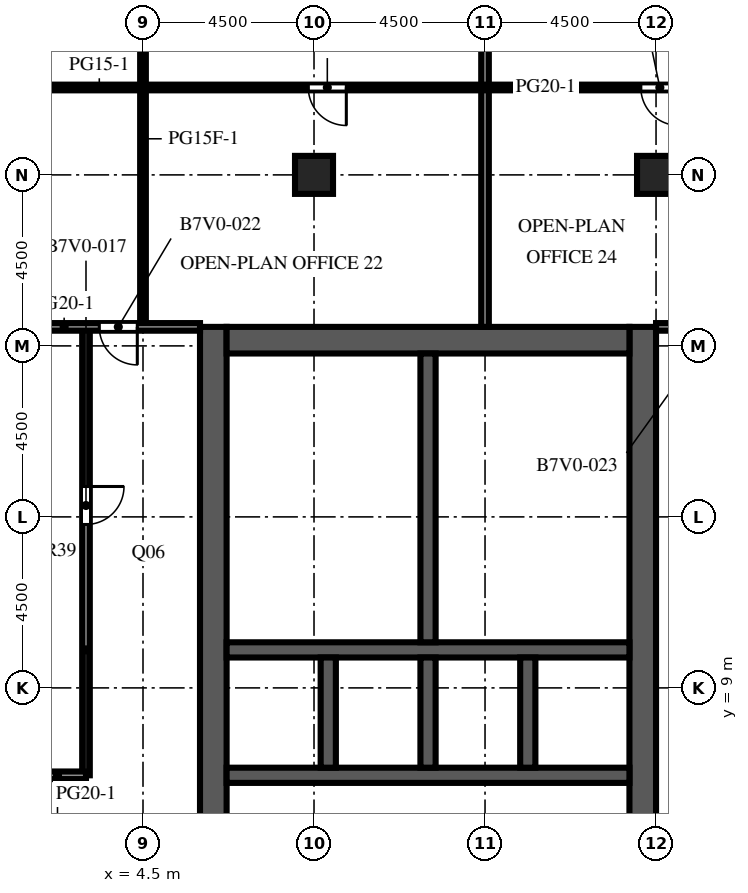
"""IFC4 building model, lengths in metres.
Left out: names, types, materials, properties, quantities, classifications, styles, units other than length and angle.
Written with IfcOpenShell. Run it as: python <this file> out.ifc"""

import sys

from ifc_helpers import new_model, si_unit, direction, frame, frame_2d, origin, origin_2d, place, context, subcontext, project, spatial, rectangle, extrude, element, fill, save


model = new_model("IFC4")
c1 = context("Model", 3, precision=1e-05, world=origin(), true_north=direction((0.0, 1.0)))
c2 = subcontext(c1, "Body", "Model", "MODEL_VIEW")
j1 = project(units=[si_unit("LENGTHUNIT", "METRE"), si_unit("PLANEANGLEUNIT", "RADIAN")], contexts=[c1])
p1 = place(None, origin())
s1 = spatial("IfcSite", under=j1, at=p1, CompositionType="ELEMENT")
p2 = place(p1, origin())
s2 = spatial("IfcBuilding", under=s1, at=p2, CompositionType="ELEMENT")
p3 = place(p2, frame((0.0, 0.0, 235.7)))
s3 = spatial("IfcBuildingStorey", under=s2, at=p3, CompositionType="ELEMENT", Elevation=235.7)
for number, where, z_axis, x_axis in (
    (1, (9.0, 22.5, 0.0), (0.0, 0.0, 1.0), (1.0, 0.0, 0.0)),
    (2, (18.0, 22.5, 0.0), (0.0, 0.0, 1.0), (1.0, 0.0, 0.0)),
):
    element("IfcColumn", number, at=place(p3, frame(where, z_axis=z_axis, x_axis=x_axis)), inside=s3, PredefinedType="COLUMN", context=c2, shape_type="SweptSolid", body=[
        extrude(rectangle(XDim=1.0, YDim=1.0, at=origin_2d()), origin(), (0.0, 0.0, 1.0), 4.1),
    ])
p4 = place(p3, frame((6.35, -9.0, 0.0), z_axis=(0.0, 0.0, 1.0), x_axis=(0.0, 1.0, 0.0)))
e3 = element("IfcWall", 3, at=p4, inside=s3, PredefinedType="SHEAR", context=c2, shape_type="SweptSolid", body=[
    extrude(rectangle(XDim=27.5, YDim=0.7, at=frame_2d((13.75, 0.0))), origin(), (0.0, 0.0, 1.0), 4.1),
])
p5 = place(p4, frame((12.55, 0.0, 0.0)))
e4 = element("IfcOpeningElement", 4, at=p5, cuts=e3, PredefinedType="OPENING", context=c2, shape_type="SweptSolid", body=[
    extrude(rectangle(XDim=2.4, YDim=2.4, at=frame_2d((1.2, 1.2))), frame((0.0, 0.36, 0.0), z_axis=(0.0, -1.0, 0.0), x_axis=(1.0, 0.0, 0.0)), (0.0, 0.0, 1.0), 0.72),
])
p6 = place(p4, frame((5.42, 0.0, 0.0)))
e5 = element("IfcOpeningElement", 5, at=p6, cuts=e3, PredefinedType="OPENING", context=c2, shape_type="SweptSolid", body=[
    extrude(rectangle(XDim=1.2, YDim=2.1, at=frame_2d((0.6, 1.05))), frame((0.0, 0.36, 0.0), z_axis=(0.0, -1.0, 0.0), x_axis=(1.0, 0.0, 0.0)), (0.0, 0.0, 1.0), 0.72),
])
p7 = place(p4, frame((19.46, 0.0, 0.0)))
e6 = element("IfcOpeningElement", 6, at=p7, cuts=e3, PredefinedType="OPENING", context=c2, shape_type="SweptSolid", body=[
    extrude(rectangle(XDim=1.0, YDim=2.1, at=frame_2d((0.5, 1.05))), frame((0.0, 0.36, 0.0), z_axis=(0.0, -1.0, 0.0), x_axis=(1.0, 0.0, 0.0)), (0.0, 0.0, 1.0), 0.72),
])
p8 = place(p4, frame((21.17, 0.0, 0.0)))
e7 = element("IfcOpeningElement", 7, at=p8, cuts=e3, PredefinedType="OPENING", context=c2, shape_type="SweptSolid", body=[
    extrude(rectangle(XDim=1.0, YDim=2.1, at=frame_2d((0.5, 1.05))), frame((0.0, 0.36, 0.0), z_axis=(0.0, -1.0, 0.0), x_axis=(1.0, 0.0, 0.0)), (0.0, 0.0, 1.0), 0.72),
])
p9 = place(p4, frame((23.26, 0.0, 0.0)))
e8 = element("IfcOpeningElement", 8, at=p9, cuts=e3, PredefinedType="OPENING", context=c2, shape_type="SweptSolid", body=[
    extrude(rectangle(XDim=1.0, YDim=2.1, at=frame_2d((0.5, 1.05))), frame((0.0, 0.36, 0.0), z_axis=(0.0, -1.0, 0.0), x_axis=(1.0, 0.0, 0.0)), (0.0, 0.0, 1.0), 0.72),
])
p10 = place(p4, frame((25.35, 0.0, 0.0)))
e9 = element("IfcOpeningElement", 9, at=p10, cuts=e3, PredefinedType="OPENING", context=c2, shape_type="SweptSolid", body=[
    extrude(rectangle(XDim=1.0, YDim=2.1, at=frame_2d((0.5, 1.05))), frame((0.0, 0.36, 0.0), z_axis=(0.0, -1.0, 0.0), x_axis=(1.0, 0.0, 0.0)), (0.0, 0.0, 1.0), 0.72),
])
p11 = place(p3, frame((17.65, -9.0, 0.0), z_axis=(0.0, 0.0, 1.0), x_axis=(0.0, 1.0, 0.0)))
e10 = element("IfcWall", 10, at=p11, inside=s3, PredefinedType="SHEAR", context=c2, shape_type="SweptSolid", body=[
    extrude(rectangle(XDim=27.5, YDim=0.7, at=frame_2d((13.75, 0.0))), origin(), (0.0, 0.0, 1.0), 4.1),
])
p12 = place(p11, frame((12.55, 0.0, 0.0)))
e11 = element("IfcOpeningElement", 11, at=p12, cuts=e10, PredefinedType="OPENING", context=c2, shape_type="SweptSolid", body=[
    extrude(rectangle(XDim=2.4, YDim=2.4, at=frame_2d((1.2, 1.2))), frame((0.0, 0.36, 0.0), z_axis=(0.0, -1.0, 0.0), x_axis=(1.0, 0.0, 0.0)), (0.0, 0.0, 1.0), 0.72),
])
p13 = place(p11, frame((6.825, 0.0, 0.0)))
e12 = element("IfcOpeningElement", 12, at=p13, cuts=e10, PredefinedType="OPENING", context=c2, shape_type="SweptSolid", body=[
    extrude(rectangle(XDim=1.2, YDim=2.1, at=frame_2d((0.6, 1.05))), frame((0.0, 0.36, 0.0), z_axis=(0.0, -1.0, 0.0), x_axis=(1.0, 0.0, 0.0)), (0.0, 0.0, 1.0), 0.72),
])
p14 = place(p11, frame((19.475, 0.0, 0.0)))
e13 = element("IfcOpeningElement", 13, at=p14, cuts=e10, PredefinedType="OPENING", context=c2, shape_type="SweptSolid", body=[
    extrude(rectangle(XDim=1.2, YDim=2.1, at=frame_2d((0.6, 1.05))), frame((0.0, 0.36, 0.0), z_axis=(0.0, -1.0, 0.0), x_axis=(1.0, 0.0, 0.0)), (0.0, 0.0, 1.0), 0.72),
])
p15 = place(p3, frame((6.7, 18.15, 0.0), z_axis=(0.0, 0.0, 1.0), x_axis=(1.0, 0.0, 0.0)))
e14 = element("IfcWall", 14, at=p15, inside=s3, PredefinedType="SHEAR", context=c2, shape_type="SweptSolid", body=[
    extrude(rectangle(XDim=10.6, YDim=0.7, at=frame_2d((5.3, 0.0))), origin(), (0.0, 0.0, 1.0), 4.1),
])
p16 = place(p3, frame((6.7, 6.7, 0.0), z_axis=(0.0, 0.0, 1.0), x_axis=(1.0, 0.0, 0.0)))
e15 = element("IfcWall", 15, at=p16, inside=s3, PredefinedType="SHEAR", context=c2, shape_type="SweptSolid", body=[
    extrude(rectangle(XDim=10.6, YDim=0.4, at=frame_2d((5.3, 0.0))), origin(), (0.0, 0.0, 1.0), 4.1),
])
p17 = place(p16, frame((3.438, 0.0, 0.0)))
e16 = element("IfcOpeningElement", 16, at=p17, cuts=e15, PredefinedType="OPENING", context=c2, shape_type="SweptSolid", body=[
    extrude(rectangle(XDim=1.1, YDim=2.1, at=frame_2d((0.55, 1.05))), frame((0.0, 0.21, 0.0), z_axis=(0.0, -1.0, 0.0), x_axis=(1.0, 0.0, 0.0)), (0.0, 0.0, 1.0), 0.42),
])
p18 = place(p16, frame((6.062, 0.0, 0.0)))
e17 = element("IfcOpeningElement", 17, at=p18, cuts=e15, PredefinedType="OPENING", context=c2, shape_type="SweptSolid", body=[
    extrude(rectangle(XDim=1.1, YDim=2.1, at=frame_2d((0.55, 1.05))), frame((0.0, 0.21, 0.0), z_axis=(0.0, -1.0, 0.0), x_axis=(1.0, 0.0, 0.0)), (0.0, 0.0, 1.0), 0.42),
])
p19 = place(p16, frame((8.812, 0.0, 0.0)))
e18 = element("IfcOpeningElement", 18, at=p19, cuts=e15, PredefinedType="OPENING", context=c2, shape_type="SweptSolid", body=[
    extrude(rectangle(XDim=1.1, YDim=2.1, at=frame_2d((0.55, 1.05))), frame((0.0, 0.21, 0.0), z_axis=(0.0, -1.0, 0.0), x_axis=(1.0, 0.0, 0.0)), (0.0, 0.0, 1.0), 0.42),
])
p20 = place(p16, frame((0.738, 0.0, 0.0)))
e19 = element("IfcOpeningElement", 19, at=p20, cuts=e15, PredefinedType="OPENING", context=c2, shape_type="SweptSolid", body=[
    extrude(rectangle(XDim=1.0, YDim=2.1, at=frame_2d((0.5, 1.05))), frame((0.0, 0.21, 0.0), z_axis=(0.0, -1.0, 0.0), x_axis=(1.0, 0.0, 0.0)), (0.0, 0.0, 1.0), 0.42),
])
p21 = place(p3, frame((6.7, 10.0, 0.0), z_axis=(0.0, 0.0, 1.0), x_axis=(1.0, 0.0, 0.0)))
e20 = element("IfcWall", 20, at=p21, inside=s3, PredefinedType="SHEAR", context=c2, shape_type="SweptSolid", body=[
    extrude(rectangle(XDim=10.6, YDim=0.4, at=frame_2d((5.3, 0.0))), origin(), (0.0, 0.0, 1.0), 4.1),
])
for number, where, z_axis, x_axis in (
    (21, (9.375, 6.9, 0.0), (0.0, 0.0, 1.0), (0.0, 1.0, 0.0)),
    (22, (12.0, 6.9, 0.0), (0.0, 0.0, 1.0), (0.0, 1.0, 0.0)),
    (23, (14.625, 6.9, 0.0), (0.0, 0.0, 1.0), (0.0, 1.0, 0.0)),
):
    element("IfcWall", number, at=place(p3, frame(where, z_axis=z_axis, x_axis=x_axis)), inside=s3, PredefinedType="SHEAR", context=c2, shape_type="SweptSolid", body=[
        extrude(rectangle(XDim=2.9, YDim=0.4, at=frame_2d((1.45, 0.0))), origin(), (0.0, 0.0, 1.0), 4.1),
    ])
p22 = place(p3, frame((12.0, 10.2, 0.0), z_axis=(0.0, 0.0, 1.0), x_axis=(0.0, 1.0, 0.0)))
e24 = element("IfcWall", 24, at=p22, inside=s3, PredefinedType="SHEAR", context=c2, shape_type="SweptSolid", body=[
    extrude(rectangle(XDim=7.6, YDim=0.4, at=frame_2d((3.8, 0.0))), origin(), (0.0, 0.0, 1.0), 4.1),
])
for number, where, z_axis, x_axis in (
    (25, (6.7, 11.72, 0.0), (0.0, 0.0, 1.0), (1.0, 0.0, 0.0)),
    (26, (6.7, 13.62, 0.0), (0.0, 0.0, 1.0), (1.0, 0.0, 0.0)),
    (27, (6.7, 15.9, 0.0), (0.0, 0.0, 1.0), (1.0, 0.0, 0.0)),
):
    element("IfcWall", number, at=place(p3, frame(where, z_axis=z_axis, x_axis=x_axis)), inside=s3, PredefinedType="PARTITIONING", context=c2, shape_type="SweptSolid", body=[
        extrude(rectangle(XDim=5.1, YDim=0.1, at=frame_2d((2.55, 0.0))), origin(), (0.0, 0.0, 1.0), 3.65),
    ])
p23 = place(p3, frame((3.0, 6.7, 0.0), z_axis=(0.0, 0.0, 1.0), x_axis=(0.0, 1.0, 0.0)))
e28 = element("IfcWall", 28, at=p23, inside=s3, PredefinedType="PARTITIONING", context=c2, shape_type="SweptSolid", body=[
    extrude(rectangle(XDim=11.8, YDim=0.2, at=frame_2d((5.9, 0.0))), origin(), (0.0, 0.0, 1.0), 3.65),
])
p24 = place(p23, frame((6.6, 0.0, 0.0)))
e29 = element("IfcOpeningElement", 29, at=p24, cuts=e28, PredefinedType="OPENING", context=c2, shape_type="SweptSolid", body=[
    extrude(rectangle(XDim=1.0, YDim=2.1, at=frame_2d((0.5, 1.05))), frame((0.0, 0.11, 0.0), z_axis=(0.0, -1.0, 0.0), x_axis=(1.0, 0.0, 0.0)), (0.0, 0.0, 1.0), 0.22),
])
p25 = place(p3, frame((4.5, 31.1, 0.0), z_axis=(0.0, 0.0, 1.0), x_axis=(0.0, -1.0, 0.0)))
e30 = element("IfcWall", 30, at=p25, inside=s3, PredefinedType="PARTITIONING", context=c2, shape_type="SweptSolid", body=[
    extrude(rectangle(XDim=12.6, YDim=0.15, at=frame_2d((6.3, 0.0))), origin(), (0.0, 0.0, 1.0), 3.65),
])
p26 = place(p25, frame((1.7, 0.0, 0.0)))
e31 = element("IfcOpeningElement", 31, at=p26, cuts=e30, PredefinedType="OPENING", context=c2, shape_type="SweptSolid", body=[
    extrude(rectangle(XDim=1.0, YDim=2.1, at=frame_2d((0.5, 1.05))), frame((0.0, 0.085, 0.0), z_axis=(0.0, -1.0, 0.0), x_axis=(1.0, 0.0, 0.0)), (0.0, 0.0, 1.0), 0.17),
])
p27 = place(p3, frame((13.5, 18.5, 0.0), z_axis=(0.0, 0.0, 1.0), x_axis=(0.0, 1.0, 0.0)))
e32 = element("IfcWall", 32, at=p27, inside=s3, PredefinedType="PARTITIONING", context=c2, shape_type="SweptSolid", body=[
    extrude(rectangle(XDim=12.6, YDim=0.2, at=frame_2d((6.3, 0.0))), origin(), (0.0, 0.0, 1.0), 3.65),
])
p28 = place(p3, frame((1.5, 6.7, 0.0), z_axis=(0.0, 0.0, 1.0), x_axis=(1.0, 0.0, 0.0)))
e33 = element("IfcWall", 33, at=p28, inside=s3, PredefinedType="PARTITIONING", context=c2, shape_type="SweptSolid", body=[
    extrude(rectangle(XDim=1.5, YDim=0.2, at=frame_2d((0.75, 0.0))), origin(), (0.0, 0.0, 1.0), 3.65),
])
p29 = place(p3, frame((1.5, 18.5, 0.0), z_axis=(0.0, 0.0, 1.0), x_axis=(1.0, 0.0, 0.0)))
e34 = element("IfcWall", 34, at=p29, inside=s3, PredefinedType="PARTITIONING", context=c2, shape_type="SweptSolid", body=[
    extrude(rectangle(XDim=4.5, YDim=0.2, at=frame_2d((2.25, 0.0))), origin(), (0.0, 0.0, 1.0), 3.65),
])
p30 = place(p29, frame((1.85, 0.0, 0.0)))
e35 = element("IfcOpeningElement", 35, at=p30, cuts=e34, PredefinedType="OPENING", context=c2, shape_type="SweptSolid", body=[
    extrude(rectangle(XDim=1.0, YDim=2.1, at=frame_2d((0.5, 1.05))), frame((0.0, 0.11, 0.0), z_axis=(0.0, -1.0, 0.0), x_axis=(1.0, 0.0, 0.0)), (0.0, 0.0, 1.0), 0.22),
])
p31 = place(p3, frame((18.0, 18.5, 0.0), z_axis=(0.0, 0.0, 1.0), x_axis=(1.0, 0.0, 0.0)))
e36 = element("IfcWall", 36, at=p31, inside=s3, PredefinedType="PARTITIONING", context=c2, shape_type="SweptSolid", body=[
    extrude(rectangle(XDim=3.0, YDim=0.2, at=frame_2d((1.5, 0.0))), origin(), (0.0, 0.0, 1.0), 3.65),
])
p32 = place(p31, frame((1.1, 0.0, 0.0)))
e37 = element("IfcOpeningElement", 37, at=p32, cuts=e36, PredefinedType="OPENING", context=c2, shape_type="SweptSolid", body=[
    extrude(rectangle(XDim=1.0, YDim=2.1, at=frame_2d((0.5, 1.05))), frame((0.0, 0.11, 0.0), z_axis=(0.0, -1.0, 0.0), x_axis=(1.0, 0.0, 0.0)), (0.0, 0.0, 1.0), 0.22),
])
p33 = place(p3, frame((-13.5, 24.8, 0.0), z_axis=(0.0, 0.0, 1.0), x_axis=(1.0, 0.0, 0.0)))
e38 = element("IfcWall", 38, at=p33, inside=s3, PredefinedType="PARTITIONING", context=c2, shape_type="SweptSolid", body=[
    extrude(rectangle(XDim=34.5, YDim=0.15, at=frame_2d((17.25, 0.0))), origin(), (0.0, 0.0, 1.0), 3.65),
])
p34 = place(p33, frame((1.6, 0.0, 0.0)))
e39 = element("IfcOpeningElement", 39, at=p34, cuts=e38, PredefinedType="OPENING", context=c2, shape_type="SweptSolid", body=[
    extrude(rectangle(XDim=1.0, YDim=2.1, at=frame_2d((0.5, 1.05))), frame((0.0, 0.085, 0.0), z_axis=(0.0, -1.0, 0.0), x_axis=(1.0, 0.0, 0.0)), (0.0, 0.0, 1.0), 0.17),
])
p35 = place(p33, frame((10.35, 0.0, 0.0)))
e40 = element("IfcOpeningElement", 40, at=p35, cuts=e38, PredefinedType="OPENING", context=c2, shape_type="SweptSolid", body=[
    extrude(rectangle(XDim=1.0, YDim=2.1, at=frame_2d((0.5, 1.05))), frame((0.0, 0.085, 0.0), z_axis=(0.0, -1.0, 0.0), x_axis=(1.0, 0.0, 0.0)), (0.0, 0.0, 1.0), 0.17),
])
p36 = place(p33, frame((22.35, 0.0, 0.0)))
e41 = element("IfcOpeningElement", 41, at=p36, cuts=e38, PredefinedType="OPENING", context=c2, shape_type="SweptSolid", body=[
    extrude(rectangle(XDim=1.0, YDim=2.1, at=frame_2d((0.5, 1.05))), frame((0.0, 0.085, 0.0), z_axis=(0.0, -1.0, 0.0), x_axis=(1.0, 0.0, 0.0)), (0.0, 0.0, 1.0), 0.17),
])
p37 = place(p33, frame((31.1, 0.0, 0.0)))
e42 = element("IfcOpeningElement", 42, at=p37, cuts=e38, PredefinedType="OPENING", context=c2, shape_type="SweptSolid", body=[
    extrude(rectangle(XDim=1.0, YDim=2.1, at=frame_2d((0.5, 1.05))), frame((0.0, 0.085, 0.0), z_axis=(0.0, -1.0, 0.0), x_axis=(1.0, 0.0, 0.0)), (0.0, 0.0, 1.0), 0.17),
])
p38 = place(p17, origin())
e43 = element("IfcDoor", 43, at=p38, inside=s3, OperationType="DOUBLE_DOOR_SLIDING", PredefinedType="DOOR", context=c2, shape_type="SweptSolid", body=[
    extrude(rectangle(XDim=1.1, YDim=2.1, at=frame_2d((0.55, 1.05))), frame((0.0, 0.025, 0.0), z_axis=(0.0, -1.0, 0.0), x_axis=(1.0, 0.0, 0.0)), (0.0, 0.0, 1.0), 0.05),
])
fill(e16, e43)
p39 = place(p18, origin())
e44 = element("IfcDoor", 44, at=p39, inside=s3, OperationType="DOUBLE_DOOR_SLIDING", PredefinedType="DOOR", context=c2, shape_type="SweptSolid", body=[
    extrude(rectangle(XDim=1.1, YDim=2.1, at=frame_2d((0.55, 1.05))), frame((0.0, 0.025, 0.0), z_axis=(0.0, -1.0, 0.0), x_axis=(1.0, 0.0, 0.0)), (0.0, 0.0, 1.0), 0.05),
])
fill(e17, e44)
p40 = place(p19, origin())
e45 = element("IfcDoor", 45, at=p40, inside=s3, OperationType="DOUBLE_DOOR_SLIDING", PredefinedType="DOOR", context=c2, shape_type="SweptSolid", body=[
    extrude(rectangle(XDim=1.1, YDim=2.1, at=frame_2d((0.55, 1.05))), frame((0.0, 0.025, 0.0), z_axis=(0.0, -1.0, 0.0), x_axis=(1.0, 0.0, 0.0)), (0.0, 0.0, 1.0), 0.05),
])
fill(e18, e45)
p41 = place(p5, origin())
e46 = element("IfcDoor", 46, at=p41, inside=s3, OperationType="DOUBLE_DOOR_DOUBLE_SWING", PredefinedType="DOOR", context=c2, shape_type="SweptSolid", body=[
    extrude(rectangle(XDim=2.4, YDim=2.4, at=frame_2d((1.2, 1.2))), frame((0.0, 0.025, 0.0), z_axis=(0.0, -1.0, 0.0), x_axis=(1.0, 0.0, 0.0)), (0.0, 0.0, 1.0), 0.05),
])
fill(e4, e46)
p42 = place(p12, origin())
e47 = element("IfcDoor", 47, at=p42, inside=s3, OperationType="DOUBLE_DOOR_DOUBLE_SWING", PredefinedType="DOOR", context=c2, shape_type="SweptSolid", body=[
    extrude(rectangle(XDim=2.4, YDim=2.4, at=frame_2d((1.2, 1.2))), frame((0.0, 0.025, 0.0), z_axis=(0.0, -1.0, 0.0), x_axis=(1.0, 0.0, 0.0)), (0.0, 0.0, 1.0), 0.05),
])
fill(e11, e47)
p43 = place(p14, frame((1.2, 0.0, 0.0), z_axis=(0.0, 0.0, 1.0), x_axis=(-1.0, 0.0, 0.0)))
e48 = element("IfcDoor", 48, at=p43, inside=s3, OperationType="SINGLE_SWING_LEFT", PredefinedType="DOOR", context=c2, shape_type="SweptSolid", body=[
    extrude(rectangle(XDim=1.2, YDim=2.1, at=frame_2d((0.6, 1.05))), frame((0.0, 0.025, 0.0), z_axis=(0.0, -1.0, 0.0), x_axis=(1.0, 0.0, 0.0)), (0.0, 0.0, 1.0), 0.05),
])
fill(e13, e48)
p44 = place(p20, origin())
e49 = element("IfcDoor", 49, at=p44, inside=s3, OperationType="SINGLE_SWING_LEFT", PredefinedType="DOOR", context=c2, shape_type="SweptSolid", body=[
    extrude(rectangle(XDim=1.0, YDim=2.1, at=frame_2d((0.5, 1.05))), frame((0.0, 0.025, 0.0), z_axis=(0.0, -1.0, 0.0), x_axis=(1.0, 0.0, 0.0)), (0.0, 0.0, 1.0), 0.05),
])
fill(e19, e49)
p45 = place(p7, origin())
e50 = element("IfcDoor", 50, at=p45, inside=s3, OperationType="SINGLE_SWING_RIGHT", PredefinedType="DOOR", context=c2, shape_type="SweptSolid", body=[
    extrude(rectangle(XDim=1.0, YDim=2.1, at=frame_2d((0.5, 1.05))), frame((0.0, -0.275, 0.0), z_axis=(0.0, -1.0, 0.0), x_axis=(1.0, 0.0, 0.0)), (0.0, 0.0, 1.0), 0.05),
])
fill(e6, e50)
p46 = place(p8, origin())
e51 = element("IfcDoor", 51, at=p46, inside=s3, OperationType="SINGLE_SWING_LEFT", PredefinedType="DOOR", context=c2, shape_type="SweptSolid", body=[
    extrude(rectangle(XDim=1.0, YDim=2.1, at=frame_2d((0.5, 1.05))), frame((0.0, -0.275, 0.0), z_axis=(0.0, -1.0, 0.0), x_axis=(1.0, 0.0, 0.0)), (0.0, 0.0, 1.0), 0.05),
])
fill(e7, e51)
p47 = place(p9, origin())
e52 = element("IfcDoor", 52, at=p47, inside=s3, OperationType="SINGLE_SWING_RIGHT", PredefinedType="DOOR", context=c2, shape_type="SweptSolid", body=[
    extrude(rectangle(XDim=1.0, YDim=2.1, at=frame_2d((0.5, 1.05))), frame((0.0, -0.275, 0.0), z_axis=(0.0, -1.0, 0.0), x_axis=(1.0, 0.0, 0.0)), (0.0, 0.0, 1.0), 0.05),
])
fill(e8, e52)
p48 = place(p10, origin())
e53 = element("IfcDoor", 53, at=p48, inside=s3, OperationType="SINGLE_SWING_LEFT", PredefinedType="DOOR", context=c2, shape_type="SweptSolid", body=[
    extrude(rectangle(XDim=1.0, YDim=2.1, at=frame_2d((0.5, 1.05))), frame((0.0, -0.275, 0.0), z_axis=(0.0, -1.0, 0.0), x_axis=(1.0, 0.0, 0.0)), (0.0, 0.0, 1.0), 0.05),
])
fill(e9, e53)
p49 = place(p24, origin())
e54 = element("IfcDoor", 54, at=p49, inside=s3, OperationType="SINGLE_SWING_RIGHT", PredefinedType="DOOR", context=c2, shape_type="SweptSolid", body=[
    extrude(rectangle(XDim=1.0, YDim=2.1, at=frame_2d((0.5, 1.05))), frame((0.0, 0.025, 0.0), z_axis=(0.0, -1.0, 0.0), x_axis=(1.0, 0.0, 0.0)), (0.0, 0.0, 1.0), 0.05),
])
fill(e29, e54)
p50 = place(p30, origin())
e55 = element("IfcDoor", 55, at=p50, inside=s3, OperationType="SINGLE_SWING_RIGHT", PredefinedType="DOOR", context=c2, shape_type="SweptSolid", body=[
    extrude(rectangle(XDim=1.0, YDim=2.1, at=frame_2d((0.5, 1.05))), frame((0.0, 0.025, 0.0), z_axis=(0.0, -1.0, 0.0), x_axis=(1.0, 0.0, 0.0)), (0.0, 0.0, 1.0), 0.05),
])
fill(e35, e55)
p51 = place(p36, origin())
e56 = element("IfcDoor", 56, at=p51, inside=s3, OperationType="SINGLE_SWING_RIGHT", PredefinedType="DOOR", context=c2, shape_type="SweptSolid", body=[
    extrude(rectangle(XDim=1.0, YDim=2.1, at=frame_2d((0.5, 1.05))), frame((0.0, 0.025, 0.0), z_axis=(0.0, -1.0, 0.0), x_axis=(1.0, 0.0, 0.0)), (0.0, 0.0, 1.0), 0.05),
])
fill(e41, e56)
p52 = place(p37, origin())
e57 = element("IfcDoor", 57, at=p52, inside=s3, OperationType="SINGLE_SWING_RIGHT", PredefinedType="DOOR", context=c2, shape_type="SweptSolid", body=[
    extrude(rectangle(XDim=1.0, YDim=2.1, at=frame_2d((0.5, 1.05))), frame((0.0, 0.025, 0.0), z_axis=(0.0, -1.0, 0.0), x_axis=(1.0, 0.0, 0.0)), (0.0, 0.0, 1.0), 0.05),
])
fill(e42, e57)
save(model, sys.argv[1])
